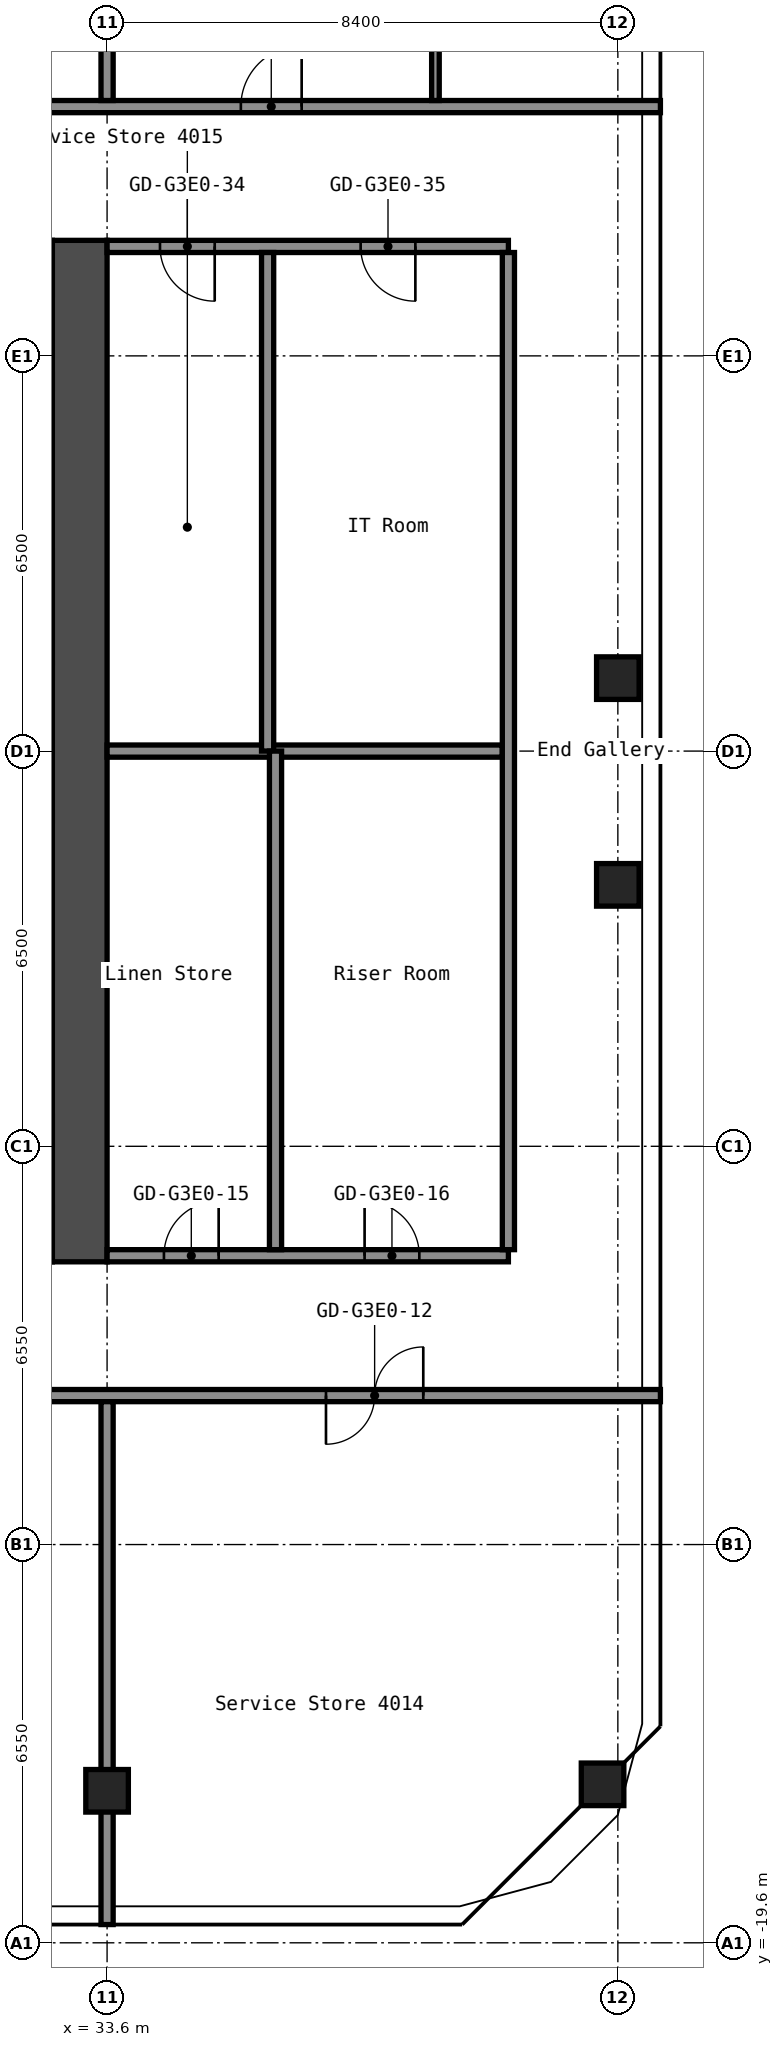
"""IFC4 building model, lengths in metres.
Left out: names, types, materials, properties, quantities, classifications, styles, units other than length and angle.
Written with IfcOpenShell. Run it as: python <this file> out.ifc"""

import sys

from ifc_helpers import new_model, si_unit, direction, frame, frame_2d, origin, origin_2d, place, context, subcontext, project, spatial, rectangle, hollow_rectangle, extrude, element, fill, save


model = new_model("IFC4")
c1 = context("Model", 3, precision=1e-05, world=origin(), true_north=direction((0.0, 1.0)))
c2 = subcontext(c1, "Body", "Model", "MODEL_VIEW")
j1 = project(units=[si_unit("LENGTHUNIT", "METRE"), si_unit("PLANEANGLEUNIT", "RADIAN")], contexts=[c1])
p1 = place(None, origin())
s1 = spatial("IfcSite", under=j1, at=p1, CompositionType="ELEMENT")
p2 = place(p1, origin())
s2 = spatial("IfcBuilding", under=s1, at=p2, CompositionType="ELEMENT")
p3 = place(p2, frame((0.0, 0.0, 143.8)))
s3 = spatial("IfcBuildingStorey", under=s2, at=p3, CompositionType="ELEMENT", Elevation=143.8)
for number, where, z_axis, x_axis in (
    (1, (33.6, -17.1, 0.0), (0.0, 0.0, 1.0), (1.0, 0.0, 0.0)),
    (2, (41.749, -16.994, 0.0), (0.0, 0.0, 1.0), (1.0, 0.0, 0.0)),
    (3, (42.0, -2.2, 0.0), (0.0, 0.0, 1.0), (1.0, 0.0, 0.0)),
    (4, (42.0, 1.2, 0.0), (0.0, 0.0, 1.0), (1.0, 0.0, 0.0)),
):
    element("IfcColumn", number, at=place(p3, frame(where, z_axis=z_axis, x_axis=x_axis)), inside=s3, PredefinedType="COLUMN", context=c2, shape_type="SweptSolid", body=[
        extrude(hollow_rectangle(XDim=0.7, YDim=0.7, WallThickness=0.028, at=origin_2d()), origin(), (0.0, 0.0, 1.0), 2.75),
    ])
p4 = place(p3, frame((33.15, -8.4, 0.0), z_axis=(0.0, 0.0, 1.0), x_axis=(0.0, 1.0, 0.0)))
e5 = element("IfcWall", 5, at=p4, inside=s3, PredefinedType="SHEAR", context=c2, shape_type="SweptSolid", body=[
    extrude(rectangle(XDim=16.8, YDim=0.9, at=frame_2d((8.4, 0.0))), origin(), (0.0, 0.0, 1.0), 2.75),
])
p5 = place(p3, frame((16.8, -10.6, 0.0), z_axis=(0.0, 0.0, 1.0), x_axis=(1.0, 0.0, 0.0)))
e6 = element("IfcWall", 6, at=p5, inside=s3, PredefinedType="PARTITIONING", context=c2, shape_type="SweptSolid", body=[
    extrude(rectangle(XDim=25.9, YDim=0.2, at=frame_2d((12.95, 0.0))), origin(), (0.0, 0.0, 1.0), 2.75),
])
p6 = place(p5, frame((3.4, 0.0, 0.0)))
e7 = element("IfcOpeningElement", 7, at=p6, cuts=e6, PredefinedType="OPENING", context=c2, shape_type="SweptSolid", body=[
    extrude(rectangle(XDim=1.6, YDim=2.1, at=frame_2d((0.8, 1.05))), frame((0.0, 0.11, 0.0), z_axis=(0.0, -1.0, 0.0), x_axis=(1.0, 0.0, 0.0)), (0.0, 0.0, 1.0), 0.22),
])
p7 = place(p5, frame((11.8, 0.0, 0.0)))
e8 = element("IfcOpeningElement", 8, at=p7, cuts=e6, PredefinedType="OPENING", context=c2, shape_type="SweptSolid", body=[
    extrude(rectangle(XDim=1.6, YDim=2.1, at=frame_2d((0.8, 1.05))), frame((0.0, 0.11, 0.0), z_axis=(0.0, -1.0, 0.0), x_axis=(1.0, 0.0, 0.0)), (0.0, 0.0, 1.0), 0.22),
])
p8 = place(p5, frame((20.4, 0.0, 0.0)))
e9 = element("IfcOpeningElement", 9, at=p8, cuts=e6, PredefinedType="OPENING", context=c2, shape_type="SweptSolid", body=[
    extrude(rectangle(XDim=1.6, YDim=2.1, at=frame_2d((0.8, 1.05))), frame((0.0, 0.11, 0.0), z_axis=(0.0, -1.0, 0.0), x_axis=(1.0, 0.0, 0.0)), (0.0, 0.0, 1.0), 0.22),
])
p9 = place(p3, frame((33.6, -8.3, 0.0), z_axis=(0.0, 0.0, 1.0), x_axis=(1.0, 0.0, 0.0)))
e10 = element("IfcWall", 10, at=p9, inside=s3, PredefinedType="PARTITIONING", context=c2, shape_type="SweptSolid", body=[
    extrude(rectangle(XDim=6.6, YDim=0.2, at=frame_2d((3.3, 0.0))), origin(), (0.0, 0.0, 1.0), 2.75),
])
p10 = place(p9, frame((0.935, 0.0, 0.0)))
e11 = element("IfcOpeningElement", 11, at=p10, cuts=e10, PredefinedType="OPENING", context=c2, shape_type="SweptSolid", body=[
    extrude(rectangle(XDim=0.9, YDim=2.1, at=frame_2d((0.45, 1.05))), frame((0.0, 0.11, 0.0), z_axis=(0.0, -1.0, 0.0), x_axis=(1.0, 0.0, 0.0)), (0.0, 0.0, 1.0), 0.22),
])
p11 = place(p9, frame((4.235, 0.0, 0.0)))
e12 = element("IfcOpeningElement", 12, at=p11, cuts=e10, PredefinedType="OPENING", context=c2, shape_type="SweptSolid", body=[
    extrude(rectangle(XDim=0.9, YDim=2.1, at=frame_2d((0.45, 1.05))), frame((0.0, 0.11, 0.0), z_axis=(0.0, -1.0, 0.0), x_axis=(1.0, 0.0, 0.0)), (0.0, 0.0, 1.0), 0.22),
])
p12 = place(p3, frame((33.6, 0.0, 0.0), z_axis=(0.0, 0.0, 1.0), x_axis=(1.0, 0.0, 0.0)))
e13 = element("IfcWall", 13, at=p12, inside=s3, PredefinedType="PARTITIONING", context=c2, shape_type="SweptSolid", body=[
    extrude(rectangle(XDim=6.5, YDim=0.2, at=frame_2d((3.25, 0.0))), origin(), (0.0, 0.0, 1.0), 2.75),
])
p13 = place(p3, frame((33.6, 8.3, 0.0), z_axis=(0.0, 0.0, 1.0), x_axis=(1.0, 0.0, 0.0)))
e14 = element("IfcWall", 14, at=p13, inside=s3, PredefinedType="PARTITIONING", context=c2, shape_type="SweptSolid", body=[
    extrude(rectangle(XDim=6.6, YDim=0.2, at=frame_2d((3.3, 0.0))), origin(), (0.0, 0.0, 1.0), 2.75),
])
p14 = place(p13, frame((0.87, 0.0, 0.0)))
e15 = element("IfcOpeningElement", 15, at=p14, cuts=e14, PredefinedType="OPENING", context=c2, shape_type="SweptSolid", body=[
    extrude(rectangle(XDim=0.9, YDim=2.1, at=frame_2d((0.45, 1.05))), frame((0.0, 0.11, 0.0), z_axis=(0.0, -1.0, 0.0), x_axis=(1.0, 0.0, 0.0)), (0.0, 0.0, 1.0), 0.22),
])
p15 = place(p13, frame((4.17, 0.0, 0.0)))
e16 = element("IfcOpeningElement", 16, at=p15, cuts=e14, PredefinedType="OPENING", context=c2, shape_type="SweptSolid", body=[
    extrude(rectangle(XDim=0.9, YDim=2.1, at=frame_2d((0.45, 1.05))), frame((0.0, 0.11, 0.0), z_axis=(0.0, -1.0, 0.0), x_axis=(1.0, 0.0, 0.0)), (0.0, 0.0, 1.0), 0.22),
])
p16 = place(p3, frame((16.8, 10.6, 0.0), z_axis=(0.0, 0.0, 1.0), x_axis=(1.0, 0.0, 0.0)))
e17 = element("IfcWall", 17, at=p16, inside=s3, PredefinedType="PARTITIONING", context=c2, shape_type="SweptSolid", body=[
    extrude(rectangle(XDim=25.9, YDim=0.2, at=frame_2d((12.95, 0.0))), origin(), (0.0, 0.0, 1.0), 2.75),
])
p17 = place(p16, frame((5.4, 0.0, 0.0)))
e18 = element("IfcOpeningElement", 18, at=p17, cuts=e17, PredefinedType="OPENING", context=c2, shape_type="SweptSolid", body=[
    extrude(rectangle(XDim=1.0, YDim=2.1, at=frame_2d((0.5, 1.05))), frame((0.0, 0.11, 0.0), z_axis=(0.0, -1.0, 0.0), x_axis=(1.0, 0.0, 0.0)), (0.0, 0.0, 1.0), 0.22),
])
p18 = place(p16, frame((13.8, 0.0, 0.0)))
e19 = element("IfcOpeningElement", 19, at=p18, cuts=e17, PredefinedType="OPENING", context=c2, shape_type="SweptSolid", body=[
    extrude(rectangle(XDim=1.0, YDim=2.1, at=frame_2d((0.5, 1.05))), frame((0.0, 0.11, 0.0), z_axis=(0.0, -1.0, 0.0), x_axis=(1.0, 0.0, 0.0)), (0.0, 0.0, 1.0), 0.22),
])
p19 = place(p16, frame((19.0, 0.0, 0.0)))
e20 = element("IfcOpeningElement", 20, at=p19, cuts=e17, PredefinedType="OPENING", context=c2, shape_type="SweptSolid", body=[
    extrude(rectangle(XDim=1.0, YDim=2.1, at=frame_2d((0.5, 1.05))), frame((0.0, 0.11, 0.0), z_axis=(0.0, -1.0, 0.0), x_axis=(1.0, 0.0, 0.0)), (0.0, 0.0, 1.0), 0.22),
])
p20 = place(p3, frame((33.6, -19.3, 0.0), z_axis=(0.0, 0.0, 1.0), x_axis=(0.0, 1.0, 0.0)))
e21 = element("IfcWall", 21, at=p20, inside=s3, PredefinedType="PARTITIONING", context=c2, shape_type="SweptSolid", body=[
    extrude(rectangle(XDim=8.6, YDim=0.2, at=frame_2d((4.3, 0.0))), origin(), (0.0, 0.0, 1.0), 2.75),
])
p21 = place(p3, frame((33.6, 10.7, 0.0), z_axis=(0.0, 0.0, 1.0), x_axis=(0.0, 1.0, 0.0)))
e22 = element("IfcWall", 22, at=p21, inside=s3, PredefinedType="PARTITIONING", context=c2, shape_type="SweptSolid", body=[
    extrude(rectangle(XDim=7.6, YDim=0.2, at=frame_2d((3.8, 0.0))), origin(), (0.0, 0.0, 1.0), 2.75),
])
for number, where, z_axis, x_axis in (
    (23, (36.24, 0.0, 0.0), (0.0, 0.0, 1.0), (0.0, 1.0, 0.0)),
    (24, (36.37, -8.2, 0.0), (0.0, 0.0, 1.0), (0.0, 1.0, 0.0)),
):
    element("IfcWall", number, at=place(p3, frame(where, z_axis=z_axis, x_axis=x_axis)), inside=s3, PredefinedType="PARTITIONING", context=c2, shape_type="SweptSolid", body=[
        extrude(rectangle(XDim=8.2, YDim=0.2, at=frame_2d((4.1, 0.0))), origin(), (0.0, 0.0, 1.0), 2.75),
    ])
p22 = place(p3, frame((39.0, 10.7, 0.0), z_axis=(0.0, 0.0, 1.0), x_axis=(0.0, 1.0, 0.0)))
e25 = element("IfcWall", 25, at=p22, inside=s3, PredefinedType="PARTITIONING", context=c2, shape_type="SweptSolid", body=[
    extrude(rectangle(XDim=3.3, YDim=0.125, at=frame_2d((1.65, 0.0))), origin(), (0.0, 0.0, 1.0), 2.75),
])
p23 = place(p3, frame((40.2, -8.2, 0.0), z_axis=(0.0, 0.0, 1.0), x_axis=(0.0, 1.0, 0.0)))
e26 = element("IfcWall", 26, at=p23, inside=s3, PredefinedType="PARTITIONING", context=c2, shape_type="SweptSolid", body=[
    extrude(rectangle(XDim=16.4, YDim=0.2, at=frame_2d((8.2, 0.0))), origin(), (0.0, 0.0, 1.0), 2.75),
])
p24 = place(p8, origin())
e27 = element("IfcDoor", 27, at=p24, inside=s3, OperationType="DOUBLE_DOOR_SINGLE_SWING", PredefinedType="DOOR", context=c2, shape_type="SweptSolid", body=[
    extrude(rectangle(XDim=1.6, YDim=2.1, at=frame_2d((0.8, 1.05))), frame((0.0, 0.025, 0.0), z_axis=(0.0, -1.0, 0.0), x_axis=(1.0, 0.0, 0.0)), (0.0, 0.0, 1.0), 0.05),
])
fill(e9, e27)
p25 = place(p10, origin())
e28 = element("IfcDoor", 28, at=p25, inside=s3, OperationType="SINGLE_SWING_LEFT", PredefinedType="DOOR", context=c2, shape_type="SweptSolid", body=[
    extrude(rectangle(XDim=0.9, YDim=2.1, at=frame_2d((0.45, 1.05))), frame((0.0, 0.025, 0.0), z_axis=(0.0, -1.0, 0.0), x_axis=(1.0, 0.0, 0.0)), (0.0, 0.0, 1.0), 0.05),
])
fill(e11, e28)
p26 = place(p11, origin())
e29 = element("IfcDoor", 29, at=p26, inside=s3, OperationType="SINGLE_SWING_RIGHT", PredefinedType="DOOR", context=c2, shape_type="SweptSolid", body=[
    extrude(rectangle(XDim=0.9, YDim=2.1, at=frame_2d((0.45, 1.05))), frame((0.0, 0.025, 0.0), z_axis=(0.0, -1.0, 0.0), x_axis=(1.0, 0.0, 0.0)), (0.0, 0.0, 1.0), 0.05),
])
fill(e12, e29)
p27 = place(p14, origin())
e30 = element("IfcDoor", 30, at=p27, inside=s3, OperationType="SINGLE_SWING_RIGHT", PredefinedType="DOOR", context=c2, shape_type="SweptSolid", body=[
    extrude(rectangle(XDim=0.9, YDim=2.1, at=frame_2d((0.45, 1.05))), frame((0.0, 0.025, 0.0), z_axis=(0.0, -1.0, 0.0), x_axis=(1.0, 0.0, 0.0)), (0.0, 0.0, 1.0), 0.05),
])
fill(e15, e30)
p28 = place(p15, origin())
e31 = element("IfcDoor", 31, at=p28, inside=s3, OperationType="SINGLE_SWING_RIGHT", PredefinedType="DOOR", context=c2, shape_type="SweptSolid", body=[
    extrude(rectangle(XDim=0.9, YDim=2.1, at=frame_2d((0.45, 1.05))), frame((0.0, 0.025, 0.0), z_axis=(0.0, -1.0, 0.0), x_axis=(1.0, 0.0, 0.0)), (0.0, 0.0, 1.0), 0.05),
])
fill(e16, e31)
p29 = place(p19, origin())
e32 = element("IfcDoor", 32, at=p29, inside=s3, OperationType="SINGLE_SWING_LEFT", PredefinedType="DOOR", context=c2, shape_type="SweptSolid", body=[
    extrude(rectangle(XDim=1.0, YDim=2.1, at=frame_2d((0.5, 1.05))), frame((0.0, 0.025, 0.0), z_axis=(0.0, -1.0, 0.0), x_axis=(1.0, 0.0, 0.0)), (0.0, 0.0, 1.0), 0.05),
])
fill(e20, e32)
save(model, sys.argv[1])
